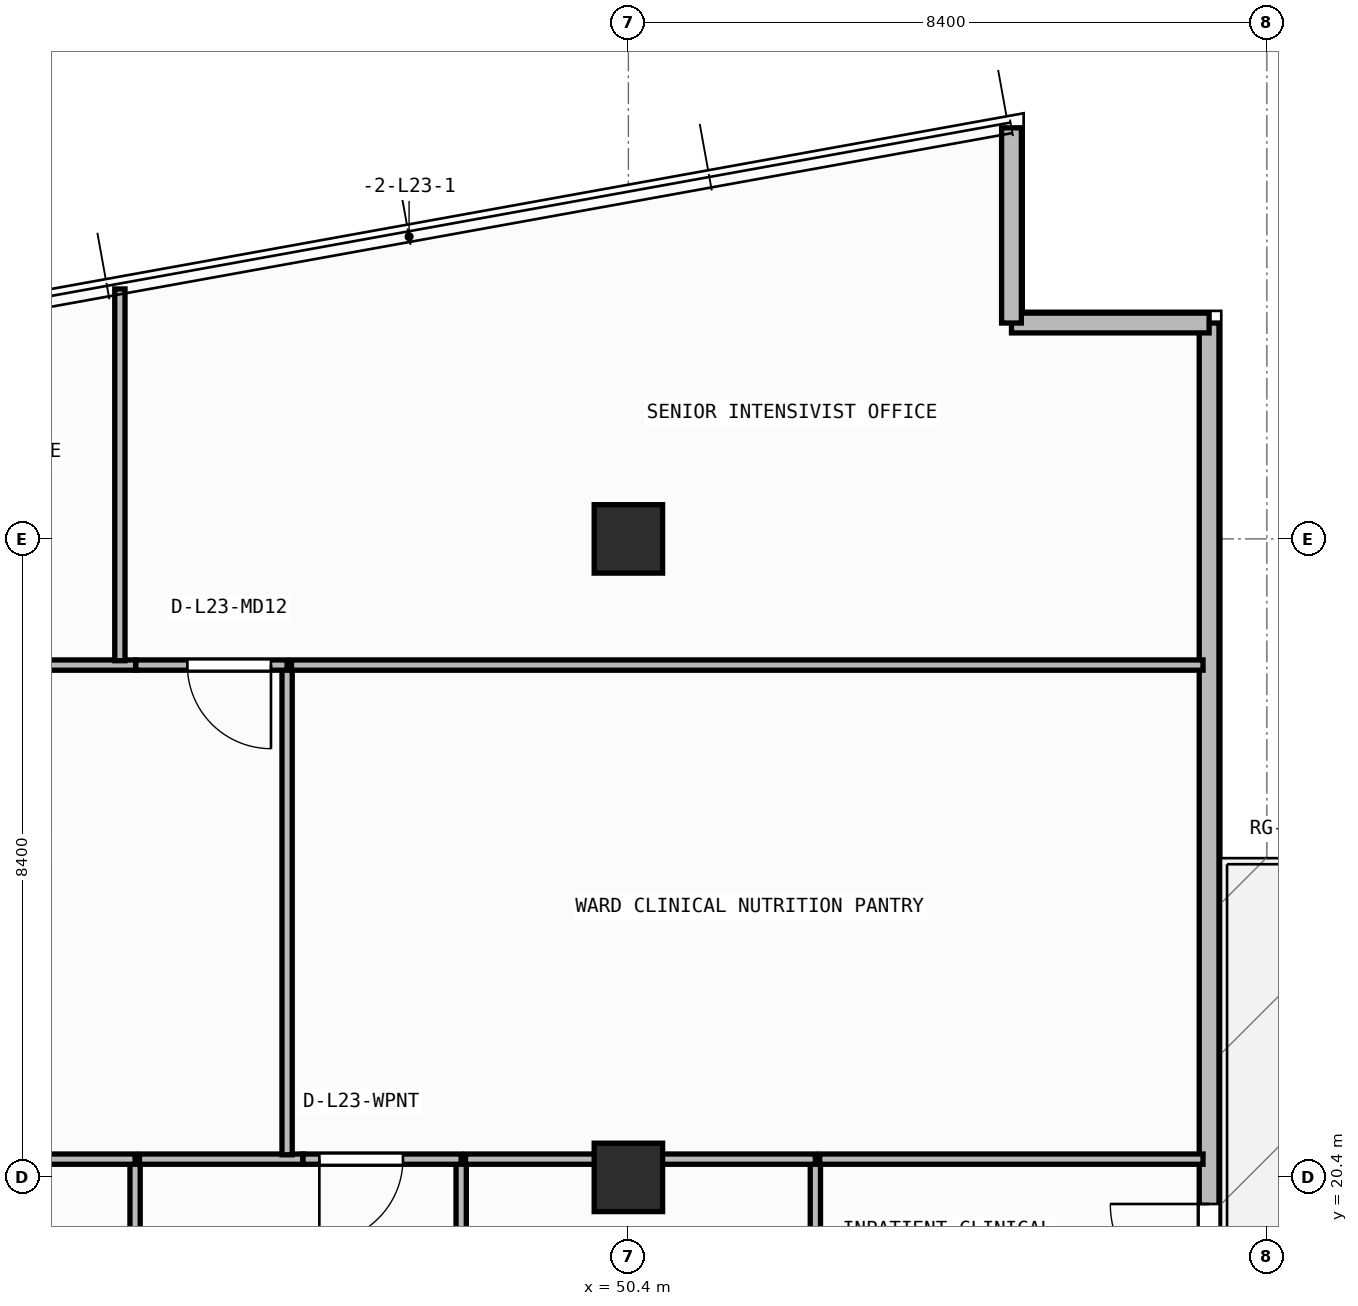
"""IFC4 building model, lengths in metres.
Left out: names, types, materials, properties, quantities, classifications, styles, units other than length and angle.
Written with IfcOpenShell. Run it as: python <this file> out.ifc"""

import sys

from ifc_helpers import new_model, si_unit, direction, frame, frame_2d, origin, origin_2d, place, context, subcontext, project, spatial, rectangle, extrude, element, fill, save


model = new_model("IFC4")
c1 = context("Model", 3, precision=1e-05, world=origin(), true_north=direction((0.0, 1.0)))
c2 = subcontext(c1, "Body", "Model", "MODEL_VIEW")
j1 = project(units=[si_unit("LENGTHUNIT", "METRE"), si_unit("PLANEANGLEUNIT", "RADIAN")], contexts=[c1])
p1 = place(None, origin())
s1 = spatial("IfcSite", under=j1, at=p1, CompositionType="ELEMENT")
p2 = place(p1, origin())
s2 = spatial("IfcBuilding", under=s1, at=p2, CompositionType="ELEMENT")
p3 = place(p2, frame((0.0, 0.0, 93.6)))
s3 = spatial("IfcBuildingStorey", under=s2, at=p3, CompositionType="ELEMENT", Elevation=93.6)
for number, where, z_axis, x_axis in (
    (1, (50.4, 20.4, 0.0), (0.0, 0.0, 1.0), (1.0, 0.0, 0.0)),
    (2, (50.4, 28.8, 0.0), (0.0, 0.0, 1.0), (1.0, 0.0, 0.0)),
):
    element("IfcColumn", number, at=place(p3, frame(where, z_axis=z_axis, x_axis=x_axis)), inside=s3, PredefinedType="COLUMN", context=c2, shape_type="SweptSolid", body=[
        extrude(rectangle(XDim=0.9, YDim=0.9, at=origin_2d()), origin(), (0.0, 0.0, 1.0), 3.95),
    ])
p4 = place(p3, frame((58.04, 7.16, 0.0), z_axis=(0.0, 0.0, 1.0), x_axis=(0.0, 1.0, 0.0)))
e3 = element("IfcWall", 3, at=p4, inside=s3, PredefinedType="STANDARD", context=c2, shape_type="SweptSolid", body=[
    extrude(rectangle(XDim=24.48, YDim=0.26, at=frame_2d((12.24, 0.0))), origin(), (0.0, 0.0, 1.0), 3.67),
])
p5 = place(p4, frame((11.59, 0.0, 0.0)))
e4 = element("IfcOpeningElement", 4, at=p5, cuts=e3, PredefinedType="OPENING", context=c2, shape_type="SweptSolid", body=[
    extrude(rectangle(XDim=1.3, YDim=2.15, at=frame_2d((0.65, 1.075))), frame((0.0, 0.14, 0.0), z_axis=(0.0, -1.0, 0.0), x_axis=(1.0, 0.0, 0.0)), (0.0, 0.0, 1.0), 0.28),
])
p6 = place(p3, frame((58.04, 31.64, 0.0), z_axis=(0.0, 0.0, 1.0), x_axis=(-1.0, 0.0, 0.0)))
e5 = element("IfcWall", 5, at=p6, inside=s3, PredefinedType="STANDARD", context=c2, shape_type="SweptSolid", body=[
    extrude(rectangle(XDim=2.6, YDim=0.26, at=frame_2d((1.3, 0.0))), origin(), (0.0, 0.0, 1.0), 3.67),
])
p7 = place(p3, frame((55.44, 31.64, 0.0), z_axis=(0.0, 0.0, 1.0), x_axis=(0.0, 1.0, 0.0)))
e6 = element("IfcWall", 6, at=p7, inside=s3, PredefinedType="STANDARD", context=c2, shape_type="SweptSolid", body=[
    extrude(rectangle(XDim=2.569, YDim=0.26, at=frame_2d((1.284, 0.0))), origin(), (0.0, 0.0, 1.0), 3.67),
])
p8 = place(p3, frame((43.91, 17.833, 0.0), z_axis=(0.0, 0.0, 1.0), x_axis=(0.0, 1.0, 0.0)))
e7 = element("IfcWall", 7, at=p8, inside=s3, PredefinedType="PARTITIONING", context=c2, shape_type="SweptSolid", body=[
    extrude(rectangle(XDim=2.807, YDim=0.135, at=frame_2d((1.404, 0.0))), origin(), (0.0, 0.0, 1.0), 3.67),
])
p9 = place(p3, frame((43.91, 20.64, 0.0), z_axis=(0.0, 0.0, 1.0), x_axis=(-1.0, 0.0, 0.0)))
e8 = element("IfcWall", 8, at=p9, inside=s3, PredefinedType="PARTITIONING", context=c2, shape_type="SweptSolid", body=[
    extrude(rectangle(XDim=4.982, YDim=0.135, at=frame_2d((2.491, 0.0))), origin(), (0.0, 0.0, 1.0), 3.033),
])
p10 = place(p9, frame((3.595, 0.0, 0.0)))
e9 = element("IfcOpeningElement", 9, at=p10, cuts=e8, PredefinedType="OPENING", context=c2, shape_type="SweptSolid", body=[
    extrude(rectangle(XDim=1.1, YDim=2.1, at=frame_2d((0.55, 1.05))), frame((0.0, 0.077, 0.0), z_axis=(0.0, -1.0, 0.0), x_axis=(1.0, 0.0, 0.0)), (0.0, 0.0, 1.0), 0.155),
])
p11 = place(p3, frame((48.2, 14.76, 0.0), z_axis=(0.0, 0.0, 1.0), x_axis=(0.0, 1.0, 0.0)))
e10 = element("IfcWall", 10, at=p11, inside=s3, PredefinedType="PARTITIONING", context=c2, shape_type="SweptSolid", body=[
    extrude(rectangle(XDim=5.88, YDim=0.135, at=frame_2d((2.94, 0.0))), origin(), (0.0, 0.0, 1.0), 3.67),
])
p12 = place(p3, frame((46.117, 20.64, 0.0), z_axis=(0.0, 0.0, 1.0), x_axis=(-1.0, 0.0, 0.0)))
e11 = element("IfcWall", 11, at=p12, inside=s3, PredefinedType="PARTITIONING", context=c2, shape_type="SweptSolid", body=[
    extrude(rectangle(XDim=2.15, YDim=0.135, at=frame_2d((1.075, 0.0))), origin(), (0.0, 0.0, 1.0), 3.033),
])
p13 = place(p3, frame((48.2, 20.64, 0.0), z_axis=(0.0, 0.0, 1.0), x_axis=(-1.0, 0.0, 0.0)))
e12 = element("IfcWall", 12, at=p13, inside=s3, PredefinedType="PARTITIONING", context=c2, shape_type="SweptSolid", body=[
    extrude(rectangle(XDim=2.081, YDim=0.135, at=frame_2d((1.04, 0.0))), origin(), (0.0, 0.0, 1.0), 3.033),
])
p14 = place(p13, frame((0.766, 0.0, 0.0)))
e13 = element("IfcOpeningElement", 13, at=p14, cuts=e12, PredefinedType="OPENING", context=c2, shape_type="SweptSolid", body=[
    extrude(rectangle(XDim=1.1, YDim=2.1, at=frame_2d((0.55, 1.05))), frame((0.0, 0.077, 0.0), z_axis=(0.0, -1.0, 0.0), x_axis=(1.0, 0.0, 0.0)), (0.0, 0.0, 1.0), 0.155),
])
p15 = place(p3, frame((52.86, 17.833, 0.0), z_axis=(0.0, 0.0, 1.0), x_axis=(0.0, 1.0, 0.0)))
e14 = element("IfcWall", 14, at=p15, inside=s3, PredefinedType="PARTITIONING", context=c2, shape_type="SweptSolid", body=[
    extrude(rectangle(XDim=2.807, YDim=0.135, at=frame_2d((1.404, 0.0))), origin(), (0.0, 0.0, 1.0), 3.67),
])
p16 = place(p3, frame((52.86, 20.64, 0.0), z_axis=(0.0, 0.0, 1.0), x_axis=(-1.0, 0.0, 0.0)))
e15 = element("IfcWall", 15, at=p16, inside=s3, PredefinedType="PARTITIONING", context=c2, shape_type="SweptSolid", body=[
    extrude(rectangle(XDim=4.603, YDim=0.135, at=frame_2d((2.301, 0.0))), origin(), (0.0, 0.0, 1.0), 3.033),
])
p17 = place(p3, frame((57.96, 20.64, 0.0), z_axis=(0.0, 0.0, 1.0), x_axis=(-1.0, 0.0, 0.0)))
e16 = element("IfcWall", 16, at=p17, inside=s3, PredefinedType="PARTITIONING", context=c2, shape_type="SweptSolid", body=[
    extrude(rectangle(XDim=5.042, YDim=0.135, at=frame_2d((2.521, 0.0))), origin(), (0.0, 0.0, 1.0), 3.67),
])
p18 = place(p3, frame((45.91, 20.698, 0.0), z_axis=(0.0, 0.0, 1.0), x_axis=(0.0, 1.0, 0.0)))
e17 = element("IfcWall", 17, at=p18, inside=s3, PredefinedType="PARTITIONING", context=c2, shape_type="SweptSolid", body=[
    extrude(rectangle(XDim=6.442, YDim=0.135, at=frame_2d((3.221, 0.0))), origin(), (0.0, 0.0, 1.0), 3.67),
])
p19 = place(p3, frame((43.917, 27.14, 0.0), z_axis=(0.0, 0.0, 1.0), x_axis=(-1.0, 0.0, 0.0)))
e18 = element("IfcWall", 18, at=p19, inside=s3, PredefinedType="PARTITIONING", context=c2, shape_type="SweptSolid", body=[
    extrude(rectangle(XDim=5.41, YDim=0.135, at=frame_2d((2.705, 0.0))), origin(), (0.0, 0.0, 1.0), 3.67),
])
p20 = place(p3, frame((45.91, 27.14, 0.0), z_axis=(0.0, 0.0, 1.0), x_axis=(-1.0, 0.0, 0.0)))
e19 = element("IfcWall", 19, at=p20, inside=s3, PredefinedType="PARTITIONING", context=c2, shape_type="SweptSolid", body=[
    extrude(rectangle(XDim=1.99, YDim=0.135, at=frame_2d((0.995, 0.0))), origin(), (0.0, 0.0, 1.0), 3.67),
])
p21 = place(p20, frame((0.212, 0.0, 0.0)))
e20 = element("IfcOpeningElement", 20, at=p21, cuts=e19, PredefinedType="OPENING", context=c2, shape_type="SweptSolid", body=[
    extrude(rectangle(XDim=1.1, YDim=2.1, at=frame_2d((0.55, 1.05))), frame((0.0, 0.077, 0.0), z_axis=(0.0, -1.0, 0.0), x_axis=(1.0, 0.0, 0.0)), (0.0, 0.0, 1.0), 0.155),
])
p22 = place(p3, frame((57.96, 27.14, 0.0), z_axis=(0.0, 0.0, 1.0), x_axis=(-1.0, 0.0, 0.0)))
e21 = element("IfcWall", 21, at=p22, inside=s3, PredefinedType="PARTITIONING", context=c2, shape_type="SweptSolid", body=[
    extrude(rectangle(XDim=11.992, YDim=0.135, at=frame_2d((5.996, 0.0))), origin(), (0.0, 0.0, 1.0), 3.67),
])
p23 = place(p3, frame((43.71, 27.198, 0.0), z_axis=(0.0, 0.0, 1.0), x_axis=(0.0, 1.0, 0.0)))
e22 = element("IfcWall", 22, at=p23, inside=s3, PredefinedType="PARTITIONING", context=c2, shape_type="SweptSolid", body=[
    extrude(rectangle(XDim=4.891, YDim=0.135, at=frame_2d((2.445, 0.0))), origin(), (0.0, 0.0, 1.0), 3.67),
])
p24 = place(p5, origin())
e23 = element("IfcDoor", 23, at=p24, inside=s3, OperationType="SINGLE_SWING_RIGHT", PredefinedType="DOOR", context=c2, shape_type="SweptSolid", body=[
    extrude(rectangle(XDim=1.3, YDim=2.15, at=frame_2d((0.65, 1.075))), frame((0.0, 0.025, 0.0), z_axis=(0.0, -1.0, 0.0), x_axis=(1.0, 0.0, 0.0)), (0.0, 0.0, 1.0), 0.05),
])
fill(e4, e23)
p25 = place(p14, origin())
e24 = element("IfcDoor", 24, at=p25, inside=s3, OperationType="SINGLE_SWING_RIGHT", PredefinedType="DOOR", context=c2, shape_type="SweptSolid", body=[
    extrude(rectangle(XDim=1.1, YDim=2.1, at=frame_2d((0.55, 1.05))), frame((0.0, 0.025, 0.0), z_axis=(0.0, -1.0, 0.0), x_axis=(1.0, 0.0, 0.0)), (0.0, 0.0, 1.0), 0.05),
])
fill(e13, e24)
p26 = place(p21, origin())
e25 = element("IfcDoor", 25, at=p26, inside=s3, OperationType="SINGLE_SWING_LEFT", PredefinedType="DOOR", context=c2, shape_type="SweptSolid", body=[
    extrude(rectangle(XDim=1.1, YDim=2.1, at=frame_2d((0.55, 1.05))), frame((0.0, 0.025, 0.0), z_axis=(0.0, -1.0, 0.0), x_axis=(1.0, 0.0, 0.0)), (0.0, 0.0, 1.0), 0.05),
])
fill(e20, e25)
save(model, sys.argv[1])
